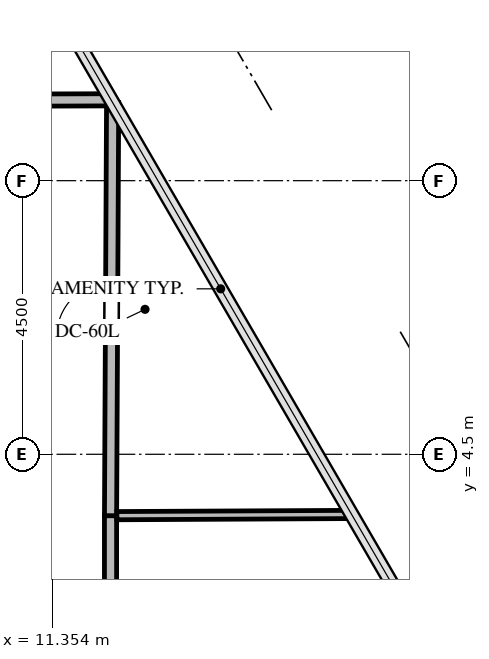
"""IFC4 building model, lengths in metres.
Left out: names, types, materials, properties, quantities, classifications, styles, units other than length and angle.
Written with IfcOpenShell. Run it as: python <this file> out.ifc"""

import sys

from ifc_helpers import new_model, si_unit, direction, frame, frame_2d, origin, place, context, subcontext, project, spatial, rectangle, extrude, source, transform, mapped, element, fill, save


model = new_model("IFC4")
c1 = context("Model", 3, precision=1e-05, world=origin(), true_north=direction((0.0, 1.0)))
c2 = subcontext(c1, "Body", "Model", "MODEL_VIEW")
j1 = project(units=[si_unit("LENGTHUNIT", "METRE"), si_unit("PLANEANGLEUNIT", "RADIAN")], contexts=[c1])
p1 = place(None, origin())
s1 = spatial("IfcSite", under=j1, at=p1, CompositionType="ELEMENT")
p2 = place(p1, origin())
s2 = spatial("IfcBuilding", under=s1, at=p2, CompositionType="ELEMENT")
p3 = place(p2, frame((0.0, 0.0, 268.3)))
s3 = spatial("IfcBuildingStorey", under=s2, at=p3, CompositionType="ELEMENT", Elevation=268.3)
p4 = place(p3, frame((12.318, 10.33, 0.0), z_axis=(0.0, 0.0, 1.0), x_axis=(-0.999994039535, -0.003452664842, 0.0)))
e1 = element("IfcWall", 1, at=p4, inside=s3, PredefinedType="SOLIDWALL", context=c2, shape_type="SweptSolid", body=[
    extrude(rectangle(XDim=5.728, YDim=0.2, at=frame_2d((2.864, 0.0))), origin(), (0.0, 0.0, 1.0), 2.32),
])
p5 = place(p4, frame((2.414, 0.0, 0.0)))
e2 = element("IfcOpeningElement", 2, at=p5, cuts=e1, PredefinedType="OPENING", context=c2, shape_type="SweptSolid", body=[
    extrude(rectangle(XDim=0.9, YDim=2.05, at=frame_2d((0.45, 1.025))), frame((0.0, 0.11, 0.0), z_axis=(0.0, -1.0, 0.0), x_axis=(1.0, 0.0, 0.0)), (0.0, 0.0, 1.0), 0.22),
])
p6 = place(p3, frame((12.31, -3.41, 0.0), z_axis=(0.0, 0.0, 1.0), x_axis=(0.0, 1.0, 0.0)))
e3 = element("IfcWall", 3, at=p6, inside=s3, PredefinedType="SOLIDWALL", context=c2, shape_type="SweptSolid", body=[
    extrude(rectangle(XDim=6.9, YDim=0.2, at=frame_2d((3.45, 0.0))), origin(), (0.0, 0.0, 1.0), 3.093),
])
p7 = place(p6, frame((3.0, 0.0, 0.0)))
e4 = element("IfcOpeningElement", 4, at=p7, cuts=e3, PredefinedType="OPENING", context=c2, shape_type="SweptSolid", body=[
    extrude(rectangle(XDim=0.9, YDim=2.05, at=frame_2d((0.45, 1.025))), frame((0.0, 0.11, 0.0), z_axis=(0.0, -1.0, 0.0), x_axis=(1.0, 0.0, 0.0)), (0.0, 0.0, 1.0), 0.22),
])
p8 = place(p3, frame((12.31, 3.49, 0.0), z_axis=(0.0, 0.0, 1.0), x_axis=(0.005031021246, 0.999987344333, 0.0)))
e5 = element("IfcWall", 5, at=p8, inside=s3, PredefinedType="SOLIDWALL", context=c2, shape_type="SweptSolid", body=[
    extrude(rectangle(XDim=6.794, YDim=0.2, at=frame_2d((3.397, 0.0))), origin(), (0.0, 0.0, 1.0), 2.32),
])
p9 = place(p8, frame((2.947, 0.0, 0.0)))
e6 = element("IfcOpeningElement", 6, at=p9, cuts=e5, PredefinedType="OPENING", context=c2, shape_type="SweptSolid", body=[
    extrude(rectangle(XDim=0.9, YDim=2.05, at=frame_2d((0.45, 1.025))), frame((0.0, 0.11, 0.0), z_axis=(0.0, -1.0, 0.0), x_axis=(1.0, 0.0, 0.0)), (0.0, 0.0, 1.0), 0.22),
])
p10 = place(p3, frame((12.414, 3.49, 0.0), z_axis=(0.0, 0.0, 1.0), x_axis=(0.999987207709, 0.005058104237, 0.0)))
e7 = element("IfcWall", 7, at=p10, inside=s3, PredefinedType="PARTITIONING", context=c2, shape_type="SweptSolid", body=[
    extrude(rectangle(XDim=3.861, YDim=0.135, at=frame_2d((1.931, 0.0))), origin(), (0.0, 0.0, 1.0), 2.32),
])
m1 = source(origin(), c2, "Body", "SweptSolid", [
    extrude(rectangle(XDim=0.9, YDim=2.05, at=frame_2d((0.45, 1.025))), frame((0.0, 0.025, 0.0), z_axis=(0.0, -1.0, 0.0), x_axis=(1.0, 0.0, 0.0)), (0.0, 0.0, 1.0), 0.05),
])
p11 = place(p9, origin())
e8 = element("IfcDoor", 8, at=p11, inside=s3, OperationType="SINGLE_SWING_LEFT", PredefinedType="DOOR", context=c2, shape_type="MappedRepresentation", body=[
    mapped(m1, transform((0.0, 0.0, 0.0), x_axis=(1.0, 0.0, 0.0), y_axis=(0.0, 1.0, 0.0), z_axis=(0.0, 0.0, 1.0), scale=1.0)),
])
fill(e6, e8)
save(model, sys.argv[1])
